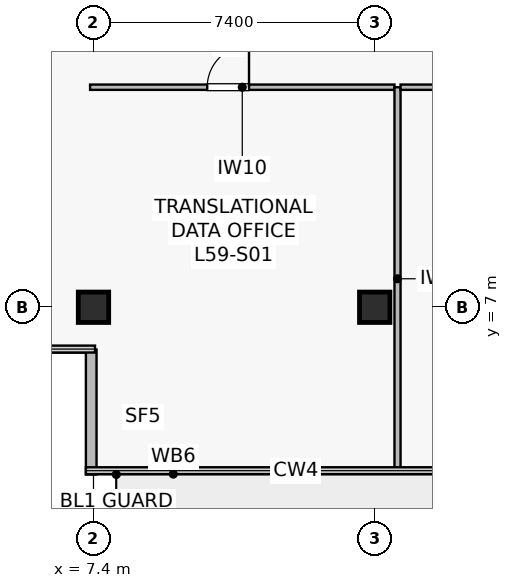
"""IFC4 building model, lengths in metres.
Left out: names, types, materials, properties, quantities, classifications, styles, units other than length and angle.
Written with IfcOpenShell. Run it as: python <this file> out.ifc"""

import sys

from ifc_helpers import new_model, si_unit, direction, frame, frame_2d, origin, origin_2d, place, context, subcontext, project, spatial, rectangle, extrude, source, transform, mapped, element, fill, save


model = new_model("IFC4")
c1 = context("Model", 3, precision=1e-05, world=origin(), true_north=direction((0.0, 1.0)))
c2 = subcontext(c1, "Body", "Model", "MODEL_VIEW")
j1 = project(units=[si_unit("LENGTHUNIT", "METRE"), si_unit("PLANEANGLEUNIT", "RADIAN")], contexts=[c1])
p1 = place(None, origin())
s1 = spatial("IfcSite", under=j1, at=p1, CompositionType="ELEMENT")
p2 = place(p1, origin())
s2 = spatial("IfcBuilding", under=s1, at=p2, CompositionType="ELEMENT")
p3 = place(p2, frame((0.0, 0.0, 246.5)))
s3 = spatial("IfcBuildingStorey", under=s2, at=p3, CompositionType="ELEMENT", Elevation=246.5)
m1 = source(origin(), c2, "Body", "SweptSolid", [
    extrude(rectangle(XDim=0.8, YDim=0.8, at=origin_2d()), origin(), (0.0, 0.0, 1.0), 4.1),
])
for number, where, z_axis, x_axis in (
    (1, (14.8, 7.0, 0.0), (0.0, 0.0, 1.0), (1.0, 0.0, 0.0)),
    (2, (7.4, 7.0, 0.0), (0.0, 0.0, 1.0), (1.0, 0.0, 0.0)),
):
    element("IfcColumn", number, at=place(p3, frame(where, z_axis=z_axis, x_axis=x_axis)), inside=s3, PredefinedType="COLUMN", context=c2, shape_type="MappedRepresentation", body=[
        mapped(m1, transform((0.0, 0.0, 0.0), scale=1.0)),
    ])
p4 = place(p3, frame((7.34, 5.888, 0.0), z_axis=(0.0, 0.0, 1.0), x_axis=(0.0, -1.0, 0.0)))
e3 = element("IfcWall", 3, at=p4, inside=s3, PredefinedType="STANDARD", context=c2, shape_type="SweptSolid", body=[
    extrude(rectangle(XDim=3.288, YDim=0.28, at=frame_2d((1.644, 0.0))), origin(), (0.0, 0.0, 1.0), 3.8),
])
p5 = place(p3, frame((7.31, 12.79, 0.0), z_axis=(0.0, 0.0, 1.0), x_axis=(1.0, 0.0, 0.0)))
e4 = element("IfcWall", 4, at=p5, inside=s3, PredefinedType="PARTITIONING", context=c2, shape_type="SweptSolid", body=[
    extrude(rectangle(XDim=8.01, YDim=0.14, at=frame_2d((4.005, 0.0))), origin(), (0.0, 0.0, 1.0), 3.197),
])
p6 = place(p5, frame((3.083, 0.0, 0.0)))
e5 = element("IfcOpeningElement", 5, at=p6, cuts=e4, PredefinedType="OPENING", context=c2, shape_type="SweptSolid", body=[
    extrude(rectangle(XDim=1.1, YDim=2.18, at=frame_2d((0.55, 1.09))), frame((0.0, 0.08, 0.0), z_axis=(0.0, -1.0, 0.0), x_axis=(1.0, 0.0, 0.0)), (0.0, 0.0, 1.0), 0.16),
])
p7 = place(p3, frame((15.4, 2.71, 0.0), z_axis=(0.0, 0.0, 1.0), x_axis=(0.0, 1.0, 0.0)))
e6 = element("IfcWall", 6, at=p7, inside=s3, PredefinedType="PARTITIONING", context=c2, shape_type="SweptSolid", body=[
    extrude(rectangle(XDim=10.08, YDim=0.16, at=frame_2d((5.04, 0.0))), origin(), (0.0, 0.0, 1.0), 3.135),
])
p8 = place(p3, frame((15.48, 12.79, 0.0), z_axis=(0.0, 0.0, 1.0), x_axis=(1.0, 0.0, 0.0)))
e7 = element("IfcWall", 7, at=p8, inside=s3, PredefinedType="PARTITIONING", context=c2, shape_type="SweptSolid", body=[
    extrude(rectangle(XDim=15.24, YDim=0.14, at=frame_2d((7.62, 0.0))), origin(), (0.0, 0.0, 1.0), 3.197),
])
p9 = place(p8, frame((7.876, 0.0, 0.0)))
e8 = element("IfcOpeningElement", 8, at=p9, cuts=e7, PredefinedType="OPENING", context=c2, shape_type="SweptSolid", body=[
    extrude(rectangle(XDim=1.1, YDim=2.18, at=frame_2d((0.55, 1.09))), frame((0.0, 0.08, 0.0), z_axis=(0.0, -1.0, 0.0), x_axis=(1.0, 0.0, 0.0)), (0.0, 0.0, 1.0), 0.16),
])
m2 = source(origin(), c2, "Body", "SweptSolid", [
    extrude(rectangle(XDim=1.1, YDim=2.18, at=frame_2d((0.55, 1.09))), frame((0.0, 0.025, 0.0), z_axis=(0.0, -1.0, 0.0), x_axis=(1.0, 0.0, 0.0)), (0.0, 0.0, 1.0), 0.05),
])
p10 = place(p6, origin())
e9 = element("IfcDoor", 9, at=p10, inside=s3, OperationType="SINGLE_SWING_RIGHT", PredefinedType="DOOR", context=c2, shape_type="MappedRepresentation", body=[
    mapped(m2, transform((0.0, 0.0, 0.0), scale=1.0)),
])
fill(e5, e9)
save(model, sys.argv[1])
